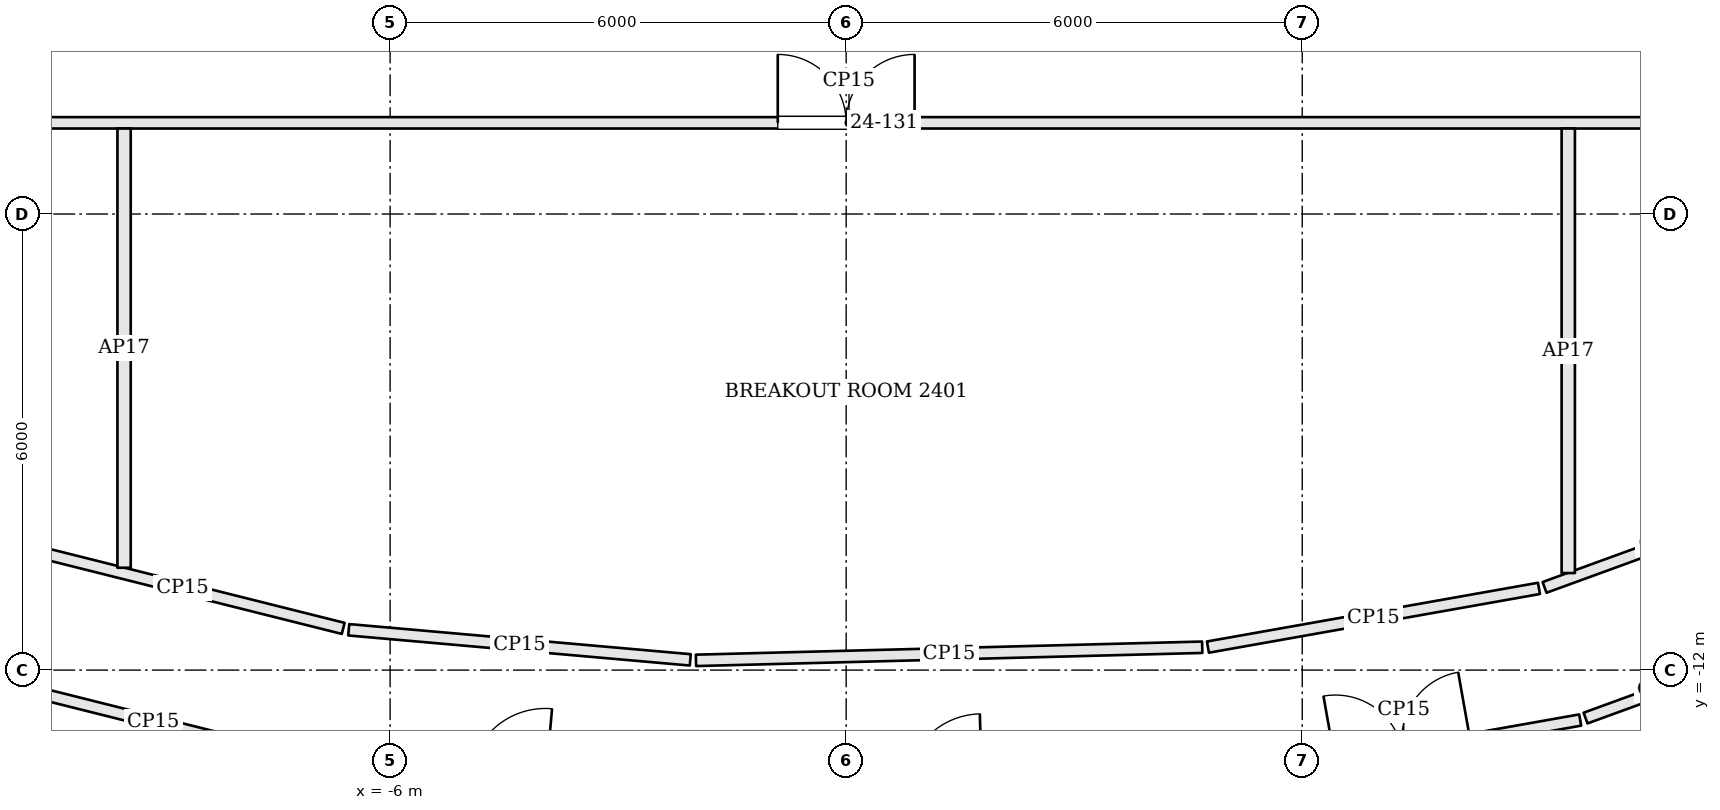
"""IFC4 building model, lengths in metres.
Left out: names, types, materials, properties, quantities, classifications, styles, units other than length and angle.
Written with IfcOpenShell. Run it as: python <this file> out.ifc"""

import sys

from ifc_helpers import new_model, si_unit, direction, frame, frame_2d, origin, place, context, subcontext, project, spatial, rectangle, extrude, element, fill, save


model = new_model("IFC4")
c1 = context("Model", 3, precision=1e-05, world=origin(), true_north=direction((0.0, 1.0)))
c2 = subcontext(c1, "Body", "Model", "MODEL_VIEW")
j1 = project(units=[si_unit("LENGTHUNIT", "METRE"), si_unit("PLANEANGLEUNIT", "RADIAN")], contexts=[c1])
p1 = place(None, origin())
s1 = spatial("IfcSite", under=j1, at=p1, CompositionType="ELEMENT")
p2 = place(p1, origin())
s2 = spatial("IfcBuilding", under=s1, at=p2, CompositionType="ELEMENT")
p3 = place(p2, frame((0.0, 0.0, 103.2)))
s3 = spatial("IfcBuildingStorey", under=s2, at=p3, CompositionType="ELEMENT", Elevation=103.2)
p4 = place(p3, frame((-11.387, -12.111, 0.0), z_axis=(0.0, 0.0, 1.0), x_axis=(0.96999205549, -0.243136612393, 0.0)))
e1 = element("IfcWall", 1, at=p4, inside=s3, PredefinedType="PARTITIONING", context=c2, shape_type="SweptSolid", body=[
    extrude(rectangle(XDim=4.683, YDim=0.15, at=frame_2d((2.342, 0.0))), origin(), (0.0, 0.0, 1.0), 2.784),
])
p5 = place(p3, frame((5.015, -13.48, 0.0), z_axis=(0.0, 0.0, 1.0), x_axis=(0.984637772103, 0.174609443467, 0.0)))
e2 = element("IfcWall", 2, at=p5, inside=s3, PredefinedType="PARTITIONING", context=c2, shape_type="SweptSolid", body=[
    extrude(rectangle(XDim=4.715, YDim=0.15, at=frame_2d((2.357, 0.0))), origin(), (0.0, 0.0, 1.0), 2.784),
])
p6 = place(p5, frame((1.444, 0.0, 0.0)))
e3 = element("IfcOpeningElement", 3, at=p6, cuts=e2, PredefinedType="OPENING", context=c2, shape_type="SweptSolid", body=[
    extrude(rectangle(XDim=1.8, YDim=2.1, at=frame_2d((0.9, 1.05))), frame((0.0, 0.085, 0.0), z_axis=(0.0, -1.0, 0.0), x_axis=(1.0, 0.0, 0.0)), (0.0, 0.0, 1.0), 0.17),
])
p7 = place(p3, frame((9.728, -12.631, 0.0), z_axis=(0.0, 0.0, 1.0), x_axis=(0.939625968265, 0.342203214133, 0.0)))
e4 = element("IfcWall", 4, at=p7, inside=s3, PredefinedType="PARTITIONING", context=c2, shape_type="SweptSolid", body=[
    extrude(rectangle(XDim=2.172, YDim=0.15, at=frame_2d((1.086, 0.0))), origin(), (0.0, 0.0, 1.0), 2.784),
])
p8 = place(p3, frame((12.353, -9.76, 0.0), z_axis=(0.0, 0.0, 1.0), x_axis=(-0.939632450309, -0.342185415127, 0.0)))
e5 = element("IfcWall", 5, at=p8, inside=s3, PredefinedType="PARTITIONING", context=c2, shape_type="SweptSolid", body=[
    extrude(rectangle(XDim=3.368, YDim=0.15, at=frame_2d((1.684, 0.0))), origin(), (0.0, 0.0, 1.0), 2.784),
])
p9 = place(p3, frame((9.115, -10.925, 0.0), z_axis=(0.0, 0.0, 1.0), x_axis=(-0.984632605417, -0.174638576352, 0.0)))
e6 = element("IfcWall", 6, at=p9, inside=s3, PredefinedType="PARTITIONING", context=c2, shape_type="SweptSolid", body=[
    extrude(rectangle(XDim=4.423, YDim=0.15, at=frame_2d((2.211, 0.0))), origin(), (0.0, 0.0, 1.0), 2.784),
])
p10 = place(p3, frame((4.684, -11.699, 0.0), z_axis=(0.0, 0.0, 1.0), x_axis=(-0.999663438204, -0.025942442425, 0.0)))
e7 = element("IfcWall", 7, at=p10, inside=s3, PredefinedType="PARTITIONING", context=c2, shape_type="SweptSolid", body=[
    extrude(rectangle(XDim=6.663, YDim=0.15, at=frame_2d((3.332, 0.0))), origin(), (0.0, 0.0, 1.0), 2.784),
])
p11 = place(p3, frame((-2.051, -11.865, 0.0), z_axis=(0.0, 0.0, 1.0), x_axis=(-0.996139599493, 0.087783246245, 0.0)))
e8 = element("IfcWall", 8, at=p11, inside=s3, PredefinedType="PARTITIONING", context=c2, shape_type="SweptSolid", body=[
    extrude(rectangle(XDim=4.511, YDim=0.15, at=frame_2d((2.255, 0.0))), origin(), (0.0, 0.0, 1.0), 2.784),
])
p12 = place(p3, frame((-6.617, -11.451, 0.0), z_axis=(0.0, 0.0, 1.0), x_axis=(-0.969987441267, 0.243155020069, 0.0)))
e9 = element("IfcWall", 9, at=p12, inside=s3, PredefinedType="PARTITIONING", context=c2, shape_type="SweptSolid", body=[
    extrude(rectangle(XDim=4.359, YDim=0.15, at=frame_2d((2.179, 0.0))), origin(), (0.0, 0.0, 1.0), 2.784),
])
p13 = place(p3, frame((-14.725, -4.8, 0.0), z_axis=(0.0, 0.0, 1.0), x_axis=(1.0, 0.0, 0.0)))
e10 = element("IfcWall", 10, at=p13, inside=s3, PredefinedType="PARTITIONING", context=c2, shape_type="SweptSolid", body=[
    extrude(rectangle(XDim=29.525, YDim=0.15, at=frame_2d((14.763, 0.0))), origin(), (0.0, 0.0, 1.0), 2.784),
])
p14 = place(p13, frame((13.825, 0.0, 0.0)))
e11 = element("IfcOpeningElement", 11, at=p14, cuts=e10, PredefinedType="OPENING", context=c2, shape_type="SweptSolid", body=[
    extrude(rectangle(XDim=1.8, YDim=2.1, at=frame_2d((0.9, 1.05))), frame((0.0, 0.085, 0.0), z_axis=(0.0, -1.0, 0.0), x_axis=(1.0, 0.0, 0.0)), (0.0, 0.0, 1.0), 0.17),
])
p15 = place(p3, frame((-9.5, -10.654, 0.0), z_axis=(0.0, 0.0, 1.0), x_axis=(0.0, 1.0, 0.0)))
e12 = element("IfcWall", 12, at=p15, inside=s3, PredefinedType="PARTITIONING", context=c2, shape_type="SweptSolid", body=[
    extrude(rectangle(XDim=5.779, YDim=0.175, at=frame_2d((2.889, 0.0))), origin(), (0.0, 0.0, 1.0), 2.784),
])
p16 = place(p3, frame((9.5, -10.723, 0.0), z_axis=(0.0, 0.0, 1.0), x_axis=(0.0, 1.0, 0.0)))
e13 = element("IfcWall", 13, at=p16, inside=s3, PredefinedType="PARTITIONING", context=c2, shape_type="SweptSolid", body=[
    extrude(rectangle(XDim=5.848, YDim=0.175, at=frame_2d((2.924, 0.0))), origin(), (0.0, 0.0, 1.0), 2.784),
])
p17 = place(p14, origin())
e14 = element("IfcDoor", 14, at=p17, inside=s3, OperationType="DOUBLE_DOOR_SINGLE_SWING", PredefinedType="DOOR", context=c2, shape_type="SweptSolid", body=[
    extrude(rectangle(XDim=1.8, YDim=2.1, at=frame_2d((0.9, 1.05))), frame((0.0, 0.025, 0.0), z_axis=(0.0, -1.0, 0.0), x_axis=(1.0, 0.0, 0.0)), (0.0, 0.0, 1.0), 0.05),
])
fill(e11, e14)
save(model, sys.argv[1])
